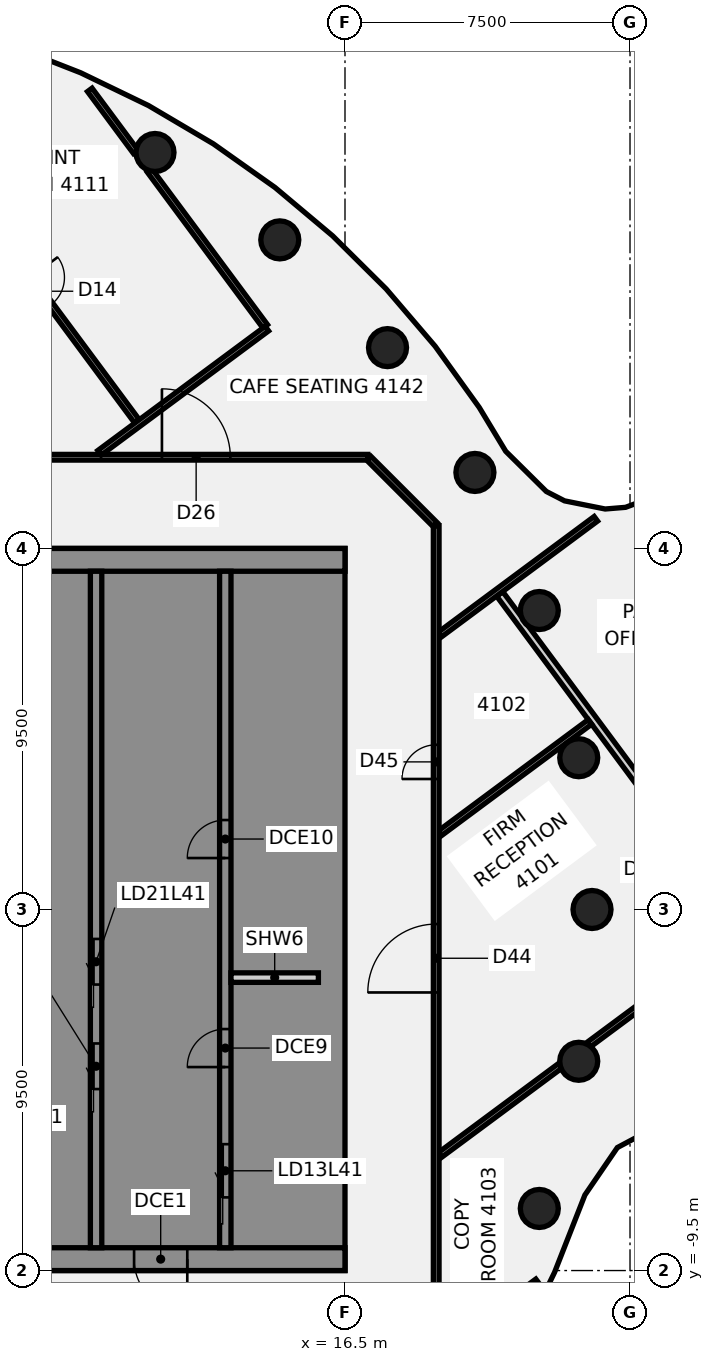
"""IFC4 building model, lengths in metres.
Left out: names, types, materials, properties, quantities, classifications, styles, units other than length and angle.
Written with IfcOpenShell. Run it as: python <this file> out.ifc"""

import sys

from ifc_helpers import new_model, si_unit, direction, frame, frame_2d, origin, origin_2d, place, context, subcontext, project, spatial, polyline, rectangle, circle, outline, extrude, element, fill, save


model = new_model("IFC4")
c1 = context("Model", 3, precision=1e-05, world=origin(), true_north=direction((0.0, 1.0)))
c2 = subcontext(c1, "Body", "Model", "MODEL_VIEW")
j1 = project(units=[si_unit("LENGTHUNIT", "METRE"), si_unit("PLANEANGLEUNIT", "RADIAN")], contexts=[c1])
p1 = place(None, origin())
s1 = spatial("IfcSite", under=j1, at=p1, CompositionType="ELEMENT")
p2 = place(p1, origin())
s2 = spatial("IfcBuilding", under=s1, at=p2, CompositionType="ELEMENT")
p3 = place(p2, frame((0.0, 0.0, 166.75)))
s3 = spatial("IfcBuildingStorey", under=s2, at=p3, CompositionType="ELEMENT", Elevation=166.75)
for number, where, z_axis, x_axis in (
    (1, (23.0, 0.0, -0.14), (0.0, 0.0, 1.0), (1.0, 0.0, 0.0)),
    (2, (22.651, 3.994, -0.14), (0.0, 0.0, 1.0), (1.0, 0.0, 0.0)),
    (3, (21.613, 7.866, -0.14), (0.0, 0.0, 1.0), (1.0, 0.0, 0.0)),
    (4, (19.919, 11.5, -0.14), (0.0, 0.0, 1.0), (1.0, 0.0, 0.0)),
    (5, (17.619, 14.784, -0.14), (0.0, 0.0, 1.0), (1.0, 0.0, 0.0)),
    (6, (14.784, 17.619, -0.14), (0.0, 0.0, 1.0), (1.0, 0.0, 0.0)),
    (7, (11.5, 19.919, -0.14), (0.0, 0.0, 1.0), (1.0, 0.0, 0.0)),
    (8, (21.613, -7.866, -0.14), (0.0, 0.0, 1.0), (1.0, 0.0, 0.0)),
    (9, (22.651, -3.994, -0.14), (0.0, 0.0, 1.0), (1.0, 0.0, 0.0)),
):
    element("IfcColumn", number, at=place(p3, frame(where, z_axis=z_axis, x_axis=x_axis)), inside=s3, PredefinedType="COLUMN", context=c2, shape_type="SweptSolid", body=[
        extrude(circle(Radius=0.5, at=origin_2d()), origin(), (0.0, 0.0, 1.0), 3.75),
    ])
p4 = place(p3, frame((4.107, 22.171, 0.0), z_axis=(0.0, 0.0, 1.0), x_axis=(0.59578611064, -0.803143144382, 0.0)))
e10 = element("IfcWall", 10, at=p4, inside=s3, PredefinedType="PARTITIONING", context=c2, shape_type="SweptSolid", body=[
    extrude(rectangle(XDim=11.61, YDim=0.15, at=frame_2d((5.805, 0.0))), origin(), (0.0, 0.0, 1.0), 3.01),
])
p5 = place(p4, frame((6.9, 0.0, 0.0)))
e11 = element("IfcOpeningElement", 11, at=p5, cuts=e10, PredefinedType="OPENING", context=c2, shape_type="SweptSolid", body=[
    extrude(rectangle(XDim=0.9, YDim=2.1, at=frame_2d((0.45, 1.05))), frame((0.0, 0.085, 0.0), z_axis=(0.0, -1.0, 0.0), x_axis=(1.0, 0.0, 0.0)), (0.0, 0.0, 1.0), 0.17),
])
p6 = place(p3, frame((9.784, 21.566, 0.0), z_axis=(0.0, 0.0, 1.0), x_axis=(0.595779392593, -0.803148127908, 0.0)))
e12 = element("IfcWall", 12, at=p6, inside=s3, PredefinedType="PARTITIONING", context=c2, shape_type="SweptSolid", body=[
    extrude(rectangle(XDim=2.031, YDim=0.15, at=frame_2d((1.016, 0.0))), origin(), (0.0, 0.0, 1.0), 3.01),
])
p7 = place(p3, frame((11.357, 19.447, 0.0), z_axis=(0.0, 0.0, 1.0), x_axis=(0.595809139837, -0.803126060396, 0.0)))
e13 = element("IfcWall", 13, at=p7, inside=s3, PredefinedType="PARTITIONING", context=c2, shape_type="SweptSolid", body=[
    extrude(rectangle(XDim=5.108, YDim=0.15, at=frame_2d((2.554, 0.0))), origin(), (0.0, 0.0, 1.0), 3.01),
])
p8 = place(p3, frame((20.572, 8.304, 0.0), z_axis=(0.0, 0.0, 1.0), x_axis=(0.595763686941, -0.803159778202, 0.0)))
e14 = element("IfcWall", 14, at=p8, inside=s3, PredefinedType="PARTITIONING", context=c2, shape_type="SweptSolid", body=[
    extrude(rectangle(XDim=14.219, YDim=0.2, at=frame_2d((7.109, 0.0))), origin(), (0.0, 0.0, 1.0), 3.01),
])
p9 = place(p8, frame((6.62, 0.0, 0.0)))
e15 = element("IfcOpeningElement", 15, at=p9, cuts=e14, PredefinedType="OPENING", context=c2, shape_type="SweptSolid", body=[
    extrude(rectangle(XDim=1.4, YDim=2.1, at=frame_2d((0.7, 1.05))), frame((0.0, 0.11, 0.0), z_axis=(0.0, -1.0, 0.0), x_axis=(1.0, 0.0, 0.0)), (0.0, 0.0, 1.0), 0.22),
])
p10 = place(p3, frame((17.128, 11.872, 0.0), z_axis=(0.0, 0.0, 1.0), x_axis=(0.707106781187, -0.707106781187, 0.0)))
e16 = element("IfcWall", 16, at=p10, inside=s3, PredefinedType="PARTITIONING", context=c2, shape_type="SweptSolid", body=[
    extrude(rectangle(XDim=2.465, YDim=0.15, at=frame_2d((1.232, 0.0))), origin(), (0.0, 0.0, 1.0), 3.01),
])
p11 = place(p3, frame((-17.065, 11.9, 0.0), z_axis=(0.0, 0.0, 1.0), x_axis=(1.0, 0.0, 0.0)))
e17 = element("IfcWall", 17, at=p11, inside=s3, PredefinedType="PARTITIONING", context=c2, shape_type="SweptSolid", body=[
    extrude(rectangle(XDim=34.165, YDim=0.15, at=frame_2d((17.083, 0.0))), origin(), (0.0, 0.0, 1.0), 3.01),
])
p12 = place(p11, frame((22.724, 0.0, 0.0)))
e18 = element("IfcOpeningElement", 18, at=p12, cuts=e17, PredefinedType="OPENING", context=c2, shape_type="SweptSolid", body=[
    extrude(rectangle(XDim=1.8, YDim=2.1, at=frame_2d((0.9, 1.05))), frame((0.0, 0.085, 0.0), z_axis=(0.0, -1.0, 0.0), x_axis=(1.0, 0.0, 0.0)), (0.0, 0.0, 1.0), 0.17),
])
p13 = place(p11, frame((28.748, 0.0, 0.0)))
e19 = element("IfcOpeningElement", 19, at=p13, cuts=e17, PredefinedType="OPENING", context=c2, shape_type="SweptSolid", body=[
    extrude(rectangle(XDim=1.8, YDim=2.1, at=frame_2d((0.9, 1.05))), frame((0.0, 0.085, 0.0), z_axis=(0.0, -1.0, 0.0), x_axis=(1.0, 0.0, 0.0)), (0.0, 0.0, 1.0), 0.17),
])
p14 = place(p11, frame((8.469, 0.0, 0.0)))
e20 = element("IfcOpeningElement", 20, at=p14, cuts=e17, PredefinedType="OPENING", context=c2, shape_type="SweptSolid", body=[
    extrude(rectangle(XDim=1.8, YDim=2.1, at=frame_2d((0.9, 1.05))), frame((0.0, 0.085, 0.0), z_axis=(0.0, -1.0, 0.0), x_axis=(1.0, 0.0, 0.0)), (0.0, 0.0, 1.0), 0.17),
])
p15 = place(p3, frame((10.04, 12.016, 0.0), z_axis=(0.0, 0.0, 1.0), x_axis=(0.803166728219, 0.595754317385, 0.0)))
e21 = element("IfcWall", 21, at=p15, inside=s3, PredefinedType="PARTITIONING", context=c2, shape_type="SweptSolid", body=[
    extrude(rectangle(XDim=5.485, YDim=0.15, at=frame_2d((2.743, 0.0))), origin(), (0.0, 0.0, 1.0), 3.01),
])
p16 = place(p3, frame((19.935, -10.994, 0.0), z_axis=(0.0, 0.0, 1.0), x_axis=(0.803148127908, 0.595779392593, 0.0)))
e22 = element("IfcWall", 22, at=p16, inside=s3, PredefinedType="PARTITIONING", context=c2, shape_type="SweptSolid", body=[
    extrude(rectangle(XDim=2.031, YDim=0.15, at=frame_2d((1.016, 0.0))), origin(), (0.0, 0.0, 1.0), 3.01),
])
p17 = place(p3, frame((19.0, -6.458, 0.0), z_axis=(0.0, 0.0, 1.0), x_axis=(0.803180127116, 0.595736253225, 0.0)))
e23 = element("IfcWall", 23, at=p17, inside=s3, PredefinedType="PARTITIONING", context=c2, shape_type="SweptSolid", body=[
    extrude(rectangle(XDim=3.947, YDim=0.15, at=frame_2d((1.974, 0.0))), origin(), (0.0, 0.0, 1.0), 3.01),
])
p18 = place(p3, frame((22.911, -3.558, 0.0), z_axis=(0.0, 0.0, 1.0), x_axis=(0.803172828939, 0.595746092605, 0.0)))
e24 = element("IfcWall", 24, at=p18, inside=s3, PredefinedType="PARTITIONING", context=c2, shape_type="SweptSolid", body=[
    extrude(rectangle(XDim=5.088, YDim=0.15, at=frame_2d((2.544, 0.0))), origin(), (0.0, 0.0, 1.0), 3.01),
])
p19 = place(p18, frame((2.7, 0.0, 0.0)))
e25 = element("IfcOpeningElement", 25, at=p19, cuts=e24, PredefinedType="OPENING", context=c2, shape_type="SweptSolid", body=[
    extrude(rectangle(XDim=0.9, YDim=2.1, at=frame_2d((0.45, 1.05))), frame((0.0, 0.085, 0.0), z_axis=(0.0, -1.0, 0.0), x_axis=(1.0, 0.0, 0.0)), (0.0, 0.0, 1.0), 0.17),
])
p20 = place(p3, frame((19.0, 2.009, 0.0), z_axis=(0.0, 0.0, 1.0), x_axis=(0.803137919157, 0.595793154385, 0.0)))
e26 = element("IfcWall", 26, at=p20, inside=s3, PredefinedType="PARTITIONING", context=c2, shape_type="SweptSolid", body=[
    extrude(rectangle(XDim=4.912, YDim=0.15, at=frame_2d((2.456, 0.0))), origin(), (0.0, 0.0, 1.0), 3.01),
])
p21 = place(p3, frame((19.0, 7.238, 0.0), z_axis=(0.0, 0.0, 1.0), x_axis=(0.803064814697, 0.595891687638, 0.0)))
e27 = element("IfcWall", 27, at=p21, inside=s3, PredefinedType="PARTITIONING", context=c2, shape_type="SweptSolid", body=[
    extrude(rectangle(XDim=5.106, YDim=0.15, at=frame_2d((2.553, 0.0))), origin(), (0.0, 0.0, 1.0), 3.01),
])
p22 = place(p3, frame((18.9, -10.1, 0.0), z_axis=(0.0, 0.0, 1.0), x_axis=(0.0, 1.0, 0.0)))
e28 = element("IfcWall", 28, at=p22, inside=s3, PredefinedType="PARTITIONING", context=c2, shape_type="SweptSolid", body=[
    extrude(rectangle(XDim=20.2, YDim=0.15, at=frame_2d((10.1, 0.0))), origin(), (0.0, 0.0, 1.0), 3.01),
])
p23 = place(p22, frame((7.917, 0.0, 0.0)))
e29 = element("IfcOpeningElement", 29, at=p23, cuts=e28, PredefinedType="OPENING", context=c2, shape_type="SweptSolid", body=[
    extrude(rectangle(XDim=1.8, YDim=2.1, at=frame_2d((0.9, 1.05))), frame((0.0, 0.085, 0.0), z_axis=(0.0, -1.0, 0.0), x_axis=(1.0, 0.0, 0.0)), (0.0, 0.0, 1.0), 0.17),
])
p24 = place(p22, frame((13.534, 0.0, 0.0)))
e30 = element("IfcOpeningElement", 30, at=p24, cuts=e28, PredefinedType="OPENING", context=c2, shape_type="SweptSolid", body=[
    extrude(rectangle(XDim=0.9, YDim=2.1, at=frame_2d((0.45, 1.05))), frame((0.0, 0.085, 0.0), z_axis=(0.0, -1.0, 0.0), x_axis=(1.0, 0.0, 0.0)), (0.0, 0.0, 1.0), 0.17),
])
p25 = place(p3, frame((16.5, -9.2, 0.0), z_axis=(0.0, 0.0, 1.0), x_axis=(-1.0, 0.0, 0.0)))
e31 = element("IfcWall", 31, at=p25, inside=s3, PredefinedType="SHEAR", context=c2, shape_type="SweptSolid", body=[
    extrude(rectangle(XDim=13.0, YDim=0.6, at=frame_2d((6.5, 0.0))), origin(), (0.0, 0.0, 1.0), 3.61),
])
p26 = place(p25, frame((4.15, 0.0, 0.0)))
e32 = element("IfcOpeningElement", 32, at=p26, cuts=e31, PredefinedType="OPENING", context=c2, shape_type="SweptSolid", body=[
    extrude(rectangle(XDim=1.4, YDim=2.1, at=frame_2d((0.7, 1.05))), frame((0.0, 0.31, 0.0), z_axis=(0.0, -1.0, 0.0), x_axis=(1.0, 0.0, 0.0)), (0.0, 0.0, 1.0), 0.62),
])
p27 = place(p25, frame((10.125, 0.0, 0.0)))
e33 = element("IfcOpeningElement", 33, at=p27, cuts=e31, PredefinedType="OPENING", context=c2, shape_type="SweptSolid", body=[
    extrude(rectangle(XDim=1.4, YDim=2.1, at=frame_2d((0.7, 1.05))), frame((0.0, 0.31, 0.0), z_axis=(0.0, -1.0, 0.0), x_axis=(1.0, 0.0, 0.0)), (0.0, 0.0, 1.0), 0.62),
])
p28 = place(p3, origin())
e34 = element("IfcWall", 34, at=p28, inside=s3, PredefinedType="SHEAR", context=c2, shape_type="SweptSolid", body=[
    extrude(outline(polyline([(13.5, -8.125), (13.5, -8.9), (15.9, -8.9), (16.5, -8.9), (16.5, 8.9), (15.9, 8.9), (13.5, 8.9), (13.5, 8.125), (15.9, 8.125), (15.9, 5.625), (13.5, 5.625), (13.5, 5.375), (15.9, 5.375), (15.9, -5.375), (13.5, -5.375), (13.5, -5.625), (15.9, -5.625), (15.9, -8.125), (13.5, -8.125)])), origin(), (0.0, 0.0, 1.0), 3.61),
])
p29 = place(p3, frame((16.5, 9.2, 0.0), z_axis=(0.0, 0.0, 1.0), x_axis=(-1.0, 0.0, 0.0)))
e35 = element("IfcWall", 35, at=p29, inside=s3, PredefinedType="SHEAR", context=c2, shape_type="SweptSolid", body=[
    extrude(rectangle(XDim=13.0, YDim=0.6, at=frame_2d((6.5, 0.0))), origin(), (0.0, 0.0, 1.0), 3.61),
])
p30 = place(p3, origin())
e36 = element("IfcWall", 36, at=p30, inside=s3, PredefinedType="SHEAR", context=c2, shape_type="SweptSolid", body=[
    extrude(outline(polyline([(9.8, -5.375), (7.5, -5.375), (7.5, -2.875), (9.8, -2.875), (9.8, -2.625), (7.5, -2.625), (7.5, -0.125), (9.8, -0.125), (9.8, 0.125), (7.5, 0.125), (7.5, 2.625), (9.8, 2.625), (9.8, 2.875), (7.5, 2.875), (7.5, 5.375), (9.8, 5.375), (9.8, 5.625), (7.5, 5.625), (7.5, 8.125), (9.8, 8.125), (9.8, 8.9), (7.5, 8.9), (7.2, 8.9), (7.2, -5.625), (7.5, -5.625), (9.8, -5.625), (9.8, -5.375)])), origin(), (0.0, 0.0, 1.0), 3.61),
])
p31 = place(p3, origin())
e37 = element("IfcWall", 37, at=p31, inside=s3, PredefinedType="SHEAR", context=c2, shape_type="SweptSolid", body=[
    extrude(outline(polyline([(7.5, -8.125), (7.5, -8.9), (9.8, -8.9), (9.8, -8.125), (9.8, -5.625), (9.55, -5.625), (9.55, -8.125), (7.5, -8.125)])), origin(), (0.0, 0.0, 1.0), 3.61),
])
p32 = place(p3, frame((13.35, -8.9, 0.0), z_axis=(0.0, 0.0, 1.0), x_axis=(0.0, 1.0, 0.0)))
e38 = element("IfcWall", 38, at=p32, inside=s3, PredefinedType="SHEAR", context=c2, shape_type="SweptSolid", body=[
    extrude(rectangle(XDim=17.8, YDim=0.3, at=frame_2d((8.9, 0.0))), origin(), (0.0, 0.0, 1.0), 3.61),
])
p33 = place(p32, frame((1.325, 0.0, 0.0)))
e39 = element("IfcOpeningElement", 39, at=p33, cuts=e38, PredefinedType="OPENING", context=c2, shape_type="SweptSolid", body=[
    extrude(rectangle(XDim=1.4, YDim=2.1, at=frame_2d((0.7, 1.05))), frame((0.0, 0.16, 0.0), z_axis=(0.0, -1.0, 0.0), x_axis=(1.0, 0.0, 0.0)), (0.0, 0.0, 1.0), 0.32),
])
p34 = place(p32, frame((4.754, 0.0, 0.0)))
e40 = element("IfcOpeningElement", 40, at=p34, cuts=e38, PredefinedType="OPENING", context=c2, shape_type="SweptSolid", body=[
    extrude(rectangle(XDim=1.0, YDim=2.1, at=frame_2d((0.5, 1.05))), frame((0.0, 0.16, 0.0), z_axis=(0.0, -1.0, 0.0), x_axis=(1.0, 0.0, 0.0)), (0.0, 0.0, 1.0), 0.32),
])
p35 = place(p32, frame((10.254, 0.0, 0.0)))
e41 = element("IfcOpeningElement", 41, at=p35, cuts=e38, PredefinedType="OPENING", context=c2, shape_type="SweptSolid", body=[
    extrude(rectangle(XDim=1.0, YDim=2.1, at=frame_2d((0.5, 1.05))), frame((0.0, 0.16, 0.0), z_axis=(0.0, -1.0, 0.0), x_axis=(1.0, 0.0, 0.0)), (0.0, 0.0, 1.0), 0.32),
])
p36 = place(p3, frame((9.95, -8.9, 0.0), z_axis=(0.0, 0.0, 1.0), x_axis=(0.0, 1.0, 0.0)))
e42 = element("IfcWall", 42, at=p36, inside=s3, PredefinedType="SHEAR", context=c2, shape_type="SweptSolid", body=[
    extrude(rectangle(XDim=17.8, YDim=0.3, at=frame_2d((8.9, 0.0))), origin(), (0.0, 0.0, 1.0), 3.61),
])
p37 = place(p36, frame((4.175, 0.0, 0.0)))
e43 = element("IfcOpeningElement", 43, at=p37, cuts=e42, PredefinedType="OPENING", context=c2, shape_type="SweptSolid", body=[
    extrude(rectangle(XDim=1.2, YDim=2.1, at=frame_2d((0.6, 1.05))), frame((0.0, 0.16, 0.0), z_axis=(0.0, -1.0, 0.0), x_axis=(1.0, 0.0, 0.0)), (0.0, 0.0, 1.0), 0.32),
])
p38 = place(p36, frame((6.925, 0.0, 0.0)))
e44 = element("IfcOpeningElement", 44, at=p38, cuts=e42, PredefinedType="OPENING", context=c2, shape_type="SweptSolid", body=[
    extrude(rectangle(XDim=1.2, YDim=2.1, at=frame_2d((0.6, 1.05))), frame((0.0, 0.16, 0.0), z_axis=(0.0, -1.0, 0.0), x_axis=(1.0, 0.0, 0.0)), (0.0, 0.0, 1.0), 0.32),
])
p39 = place(p3, frame((15.8, -1.792, 0.0), z_axis=(0.0, 0.0, 1.0), x_axis=(-1.0, 0.0, 0.0)))
e45 = element("IfcWall", 45, at=p39, inside=s3, PredefinedType="PARTITIONING", context=c2, shape_type="SweptSolid", body=[
    extrude(rectangle(XDim=2.3, YDim=0.25, at=frame_2d((1.15, 0.0))), origin(), (0.0, 0.0, 1.0), 3.61),
])
p40 = place(p13, origin())
e46 = element("IfcDoor", 46, at=p40, inside=s3, OperationType="DOUBLE_DOOR_SINGLE_SWING", PredefinedType="DOOR", context=c2, shape_type="SweptSolid", body=[
    extrude(rectangle(XDim=1.8, YDim=2.1, at=frame_2d((0.9, 1.05))), frame((0.0, 0.025, 0.0), z_axis=(0.0, -1.0, 0.0), x_axis=(1.0, 0.0, 0.0)), (0.0, 0.0, 1.0), 0.05),
])
fill(e19, e46)
p41 = place(p23, origin())
e47 = element("IfcDoor", 47, at=p41, inside=s3, OperationType="DOUBLE_DOOR_SINGLE_SWING", PredefinedType="DOOR", context=c2, shape_type="SweptSolid", body=[
    extrude(rectangle(XDim=1.8, YDim=2.1, at=frame_2d((0.9, 1.05))), frame((0.0, 0.025, 0.0), z_axis=(0.0, -1.0, 0.0), x_axis=(1.0, 0.0, 0.0)), (0.0, 0.0, 1.0), 0.05),
])
fill(e29, e47)
p42 = place(p24, frame((0.9, 0.0, 0.0), z_axis=(0.0, 0.0, 1.0), x_axis=(-1.0, 0.0, 0.0)))
e48 = element("IfcDoor", 48, at=p42, inside=s3, OperationType="SINGLE_SWING_RIGHT", PredefinedType="DOOR", context=c2, shape_type="SweptSolid", body=[
    extrude(rectangle(XDim=0.9, YDim=2.1, at=frame_2d((0.45, 1.05))), frame((0.0, 0.025, 0.0), z_axis=(0.0, -1.0, 0.0), x_axis=(1.0, 0.0, 0.0)), (0.0, 0.0, 1.0), 0.05),
])
fill(e30, e48)
p43 = place(p26, origin())
e49 = element("IfcDoor", 49, at=p43, inside=s3, OperationType="SINGLE_SWING_LEFT", PredefinedType="DOOR", context=c2, shape_type="SweptSolid", body=[
    extrude(rectangle(XDim=1.4, YDim=2.1, at=frame_2d((0.7, 1.05))), frame((0.0, 0.025, 0.0), z_axis=(0.0, -1.0, 0.0), x_axis=(1.0, 0.0, 0.0)), (0.0, 0.0, 1.0), 0.05),
])
fill(e32, e49)
p44 = place(p33, origin())
e50 = element("IfcDoor", 50, at=p44, inside=s3, OperationType="SLIDING_TO_LEFT", PredefinedType="DOOR", context=c2, shape_type="SweptSolid", body=[
    extrude(rectangle(XDim=1.4, YDim=2.1, at=frame_2d((0.7, 1.05))), frame((0.0, 0.025, 0.0), z_axis=(0.0, -1.0, 0.0), x_axis=(1.0, 0.0, 0.0)), (0.0, 0.0, 1.0), 0.05),
])
fill(e39, e50)
p45 = place(p37, origin())
e51 = element("IfcDoor", 51, at=p45, inside=s3, OperationType="SLIDING_TO_LEFT", PredefinedType="DOOR", context=c2, shape_type="SweptSolid", body=[
    extrude(rectangle(XDim=1.2, YDim=2.1, at=frame_2d((0.6, 1.05))), frame((0.0, 0.025, 0.0), z_axis=(0.0, -1.0, 0.0), x_axis=(1.0, 0.0, 0.0)), (0.0, 0.0, 1.0), 0.05),
])
fill(e43, e51)
p46 = place(p38, origin())
e52 = element("IfcDoor", 52, at=p46, inside=s3, OperationType="SLIDING_TO_LEFT", PredefinedType="DOOR", context=c2, shape_type="SweptSolid", body=[
    extrude(rectangle(XDim=1.2, YDim=2.1, at=frame_2d((0.6, 1.05))), frame((0.0, 0.025, 0.0), z_axis=(0.0, -1.0, 0.0), x_axis=(1.0, 0.0, 0.0)), (0.0, 0.0, 1.0), 0.05),
])
fill(e44, e52)
p47 = place(p34, origin())
e53 = element("IfcDoor", 53, at=p47, inside=s3, OperationType="SINGLE_SWING_LEFT", PredefinedType="DOOR", context=c2, shape_type="SweptSolid", body=[
    extrude(rectangle(XDim=1.0, YDim=2.1, at=frame_2d((0.5, 1.05))), frame((0.0, 0.025, 0.0), z_axis=(0.0, -1.0, 0.0), x_axis=(1.0, 0.0, 0.0)), (0.0, 0.0, 1.0), 0.05),
])
fill(e40, e53)
p48 = place(p35, origin())
e54 = element("IfcDoor", 54, at=p48, inside=s3, OperationType="SINGLE_SWING_LEFT", PredefinedType="DOOR", context=c2, shape_type="SweptSolid", body=[
    extrude(rectangle(XDim=1.0, YDim=2.1, at=frame_2d((0.5, 1.05))), frame((0.0, 0.025, 0.0), z_axis=(0.0, -1.0, 0.0), x_axis=(1.0, 0.0, 0.0)), (0.0, 0.0, 1.0), 0.05),
])
fill(e41, e54)
save(model, sys.argv[1])
